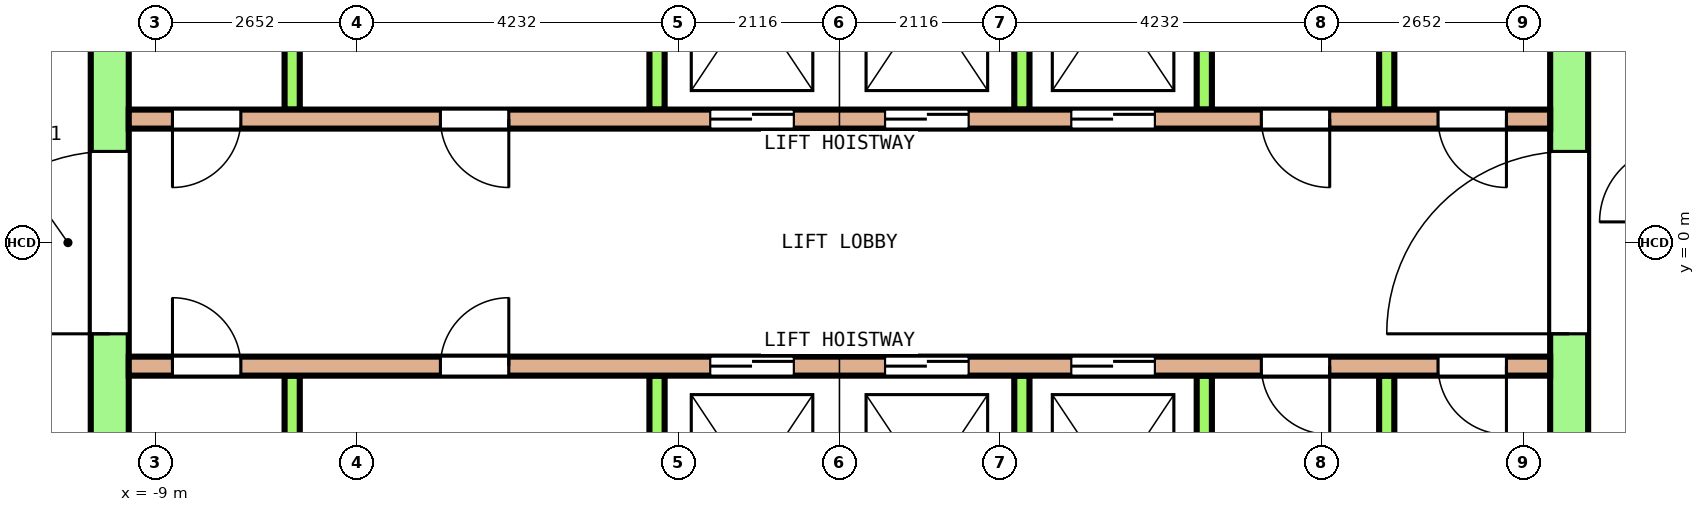
"""IFC4 building model, lengths in metres.
Left out: names, types, materials, properties, quantities, classifications, styles, units other than length and angle.
Written with IfcOpenShell. Run it as: python <this file> out.ifc"""

import sys

from ifc_helpers import new_model, si_unit, direction, frame, frame_2d, origin, place, context, subcontext, project, spatial, rectangle, extrude, element, fill, save


model = new_model("IFC4")
c1 = context("Model", 3, precision=1e-05, world=origin(), true_north=direction((0.0, 1.0)))
c2 = subcontext(c1, "Body", "Model", "MODEL_VIEW")
j1 = project(units=[si_unit("LENGTHUNIT", "METRE"), si_unit("PLANEANGLEUNIT", "RADIAN")], contexts=[c1])
p1 = place(None, origin())
s1 = spatial("IfcSite", under=j1, at=p1, CompositionType="ELEMENT")
p2 = place(p1, origin())
s2 = spatial("IfcBuilding", under=s1, at=p2, CompositionType="ELEMENT")
p3 = place(p2, frame((0.0, 0.0, 249.4)))
s3 = spatial("IfcBuildingStorey", under=s2, at=p3, CompositionType="ELEMENT", Elevation=249.4)
p4 = place(p3, frame((-9.6, -7.8, 0.0), z_axis=(0.0, 0.0, 1.0), x_axis=(0.0, 1.0, 0.0)))
e1 = element("IfcWall", 1, at=p4, inside=s3, PredefinedType="SHEAR", context=c2, shape_type="SweptSolid", body=[
    extrude(rectangle(XDim=15.6, YDim=0.5, at=frame_2d((7.8, 0.0))), origin(), (0.0, 0.0, 1.0), 3.7),
])
p5 = place(p4, frame((6.6, 0.0, 0.0)))
e2 = element("IfcOpeningElement", 2, at=p5, cuts=e1, PredefinedType="OPENING", context=c2, shape_type="SweptSolid", body=[
    extrude(rectangle(XDim=2.4, YDim=2.1, at=frame_2d((1.2, 1.05))), frame((0.0, 0.26, 0.0), z_axis=(0.0, -1.0, 0.0), x_axis=(1.0, 0.0, 0.0)), (0.0, 0.0, 1.0), 0.52),
])
p6 = place(p4, frame((13.5, 0.0, 0.0)))
e3 = element("IfcOpeningElement", 3, at=p6, cuts=e1, PredefinedType="OPENING", context=c2, shape_type="SweptSolid", body=[
    extrude(rectangle(XDim=1.2, YDim=2.1, at=frame_2d((0.6, 1.05))), frame((0.0, 0.26, 0.0), z_axis=(0.0, -1.0, 0.0), x_axis=(1.0, 0.0, 0.0)), (0.0, 0.0, 1.0), 0.52),
])
p7 = place(p4, frame((0.9, 0.0, 0.0)))
e4 = element("IfcOpeningElement", 4, at=p7, cuts=e1, PredefinedType="OPENING", context=c2, shape_type="SweptSolid", body=[
    extrude(rectangle(XDim=1.2, YDim=2.1, at=frame_2d((0.6, 1.05))), frame((0.0, 0.26, 0.0), z_axis=(0.0, -1.0, 0.0), x_axis=(1.0, 0.0, 0.0)), (0.0, 0.0, 1.0), 0.52),
])
p8 = place(p3, frame((9.6, -7.8, 0.0), z_axis=(0.0, 0.0, 1.0), x_axis=(0.0, 1.0, 0.0)))
e5 = element("IfcWall", 5, at=p8, inside=s3, PredefinedType="SHEAR", context=c2, shape_type="SweptSolid", body=[
    extrude(rectangle(XDim=15.6, YDim=0.5, at=frame_2d((7.8, 0.0))), origin(), (0.0, 0.0, 1.0), 3.7),
])
p9 = place(p8, frame((6.6, 0.0, 0.0)))
e6 = element("IfcOpeningElement", 6, at=p9, cuts=e5, PredefinedType="OPENING", context=c2, shape_type="SweptSolid", body=[
    extrude(rectangle(XDim=2.4, YDim=2.1, at=frame_2d((1.2, 1.05))), frame((0.0, 0.26, 0.0), z_axis=(0.0, -1.0, 0.0), x_axis=(1.0, 0.0, 0.0)), (0.0, 0.0, 1.0), 0.52),
])
p10 = place(p8, frame((13.5, 0.0, 0.0)))
e7 = element("IfcOpeningElement", 7, at=p10, cuts=e5, PredefinedType="OPENING", context=c2, shape_type="SweptSolid", body=[
    extrude(rectangle(XDim=1.2, YDim=2.1, at=frame_2d((0.6, 1.05))), frame((0.0, 0.26, 0.0), z_axis=(0.0, -1.0, 0.0), x_axis=(1.0, 0.0, 0.0)), (0.0, 0.0, 1.0), 0.52),
])
p11 = place(p8, frame((1.0, 0.0, 0.0)))
e8 = element("IfcOpeningElement", 8, at=p11, cuts=e5, PredefinedType="OPENING", context=c2, shape_type="SweptSolid", body=[
    extrude(rectangle(XDim=1.0, YDim=2.1, at=frame_2d((0.5, 1.05))), frame((0.0, 0.26, 0.0), z_axis=(0.0, -1.0, 0.0), x_axis=(1.0, 0.0, 0.0)), (0.0, 0.0, 1.0), 0.52),
])
p12 = place(p3, frame((-9.35, 1.625, 0.0), z_axis=(0.0, 0.0, 1.0), x_axis=(1.0, 0.0, 0.0)))
e9 = element("IfcWall", 9, at=p12, inside=s3, PredefinedType="SOLIDWALL", context=c2, shape_type="SweptSolid", body=[
    extrude(rectangle(XDim=18.7, YDim=0.25, at=frame_2d((9.35, 0.0))), origin(), (0.0, 0.0, 1.0), 3.7),
])
p13 = place(p12, frame((7.65, 0.0, 0.0)))
e10 = element("IfcOpeningElement", 10, at=p13, cuts=e9, PredefinedType="OPENING", context=c2, shape_type="SweptSolid", body=[
    extrude(rectangle(XDim=1.1, YDim=2.1, at=frame_2d((0.55, 1.05))), frame((0.0, 0.135, 0.0), z_axis=(0.0, -1.0, 0.0), x_axis=(1.0, 0.0, 0.0)), (0.0, 0.0, 1.0), 0.27),
])
p14 = place(p12, frame((9.95, 0.0, 0.0)))
e11 = element("IfcOpeningElement", 11, at=p14, cuts=e9, PredefinedType="OPENING", context=c2, shape_type="SweptSolid", body=[
    extrude(rectangle(XDim=1.1, YDim=2.1, at=frame_2d((0.55, 1.05))), frame((0.0, 0.135, 0.0), z_axis=(0.0, -1.0, 0.0), x_axis=(1.0, 0.0, 0.0)), (0.0, 0.0, 1.0), 0.27),
])
p15 = place(p12, frame((12.4, 0.0, 0.0)))
e12 = element("IfcOpeningElement", 12, at=p15, cuts=e9, PredefinedType="OPENING", context=c2, shape_type="SweptSolid", body=[
    extrude(rectangle(XDim=1.1, YDim=2.1, at=frame_2d((0.55, 1.05))), frame((0.0, 0.135, 0.0), z_axis=(0.0, -1.0, 0.0), x_axis=(1.0, 0.0, 0.0)), (0.0, 0.0, 1.0), 0.27),
])
p16 = place(p12, frame((0.575, 0.0, 0.0)))
e13 = element("IfcOpeningElement", 13, at=p16, cuts=e9, PredefinedType="OPENING", context=c2, shape_type="SweptSolid", body=[
    extrude(rectangle(XDim=0.9, YDim=2.1, at=frame_2d((0.45, 1.05))), frame((0.0, 0.135, 0.0), z_axis=(0.0, -1.0, 0.0), x_axis=(1.0, 0.0, 0.0)), (0.0, 0.0, 1.0), 0.27),
])
p17 = place(p12, frame((4.1, 0.0, 0.0)))
e14 = element("IfcOpeningElement", 14, at=p17, cuts=e9, PredefinedType="OPENING", context=c2, shape_type="SweptSolid", body=[
    extrude(rectangle(XDim=0.9, YDim=2.1, at=frame_2d((0.45, 1.05))), frame((0.0, 0.135, 0.0), z_axis=(0.0, -1.0, 0.0), x_axis=(1.0, 0.0, 0.0)), (0.0, 0.0, 1.0), 0.27),
])
p18 = place(p12, frame((14.9, 0.0, 0.0)))
e15 = element("IfcOpeningElement", 15, at=p18, cuts=e9, PredefinedType="OPENING", context=c2, shape_type="SweptSolid", body=[
    extrude(rectangle(XDim=0.9, YDim=2.1, at=frame_2d((0.45, 1.05))), frame((0.0, 0.135, 0.0), z_axis=(0.0, -1.0, 0.0), x_axis=(1.0, 0.0, 0.0)), (0.0, 0.0, 1.0), 0.27),
])
p19 = place(p12, frame((17.225, 0.0, 0.0)))
e16 = element("IfcOpeningElement", 16, at=p19, cuts=e9, PredefinedType="OPENING", context=c2, shape_type="SweptSolid", body=[
    extrude(rectangle(XDim=0.9, YDim=2.1, at=frame_2d((0.45, 1.05))), frame((0.0, 0.135, 0.0), z_axis=(0.0, -1.0, 0.0), x_axis=(1.0, 0.0, 0.0)), (0.0, 0.0, 1.0), 0.27),
])
for number, where, z_axis, x_axis in (
    (17, (-7.2, 1.75, 0.0), (0.0, 0.0, 1.0), (0.0, 1.0, 0.0)),
    (18, (-2.4, 1.75, 0.0), (0.0, 0.0, 1.0), (0.0, 1.0, 0.0)),
    (19, (2.4, 1.75, 0.0), (0.0, 0.0, 1.0), (0.0, 1.0, 0.0)),
    (20, (4.8, 1.75, 0.0), (0.0, 0.0, 1.0), (0.0, 1.0, 0.0)),
    (21, (7.2, 1.75, 0.0), (0.0, 0.0, 1.0), (0.0, 1.0, 0.0)),
):
    element("IfcWall", number, at=place(p3, frame(where, z_axis=z_axis, x_axis=x_axis)), inside=s3, PredefinedType="SOLIDWALL", context=c2, shape_type="SweptSolid", body=[
        extrude(rectangle(XDim=2.9, YDim=0.2, at=frame_2d((1.45, 0.0))), origin(), (0.0, 0.0, 1.0), 3.7),
    ])
p20 = place(p3, frame((-9.35, -1.625, 0.0), z_axis=(0.0, 0.0, 1.0), x_axis=(1.0, 0.0, 0.0)))
e22 = element("IfcWall", 22, at=p20, inside=s3, PredefinedType="SOLIDWALL", context=c2, shape_type="SweptSolid", body=[
    extrude(rectangle(XDim=18.7, YDim=0.25, at=frame_2d((9.35, 0.0))), origin(), (0.0, 0.0, 1.0), 3.7),
])
p21 = place(p20, frame((7.65, 0.0, 0.0)))
e23 = element("IfcOpeningElement", 23, at=p21, cuts=e22, PredefinedType="OPENING", context=c2, shape_type="SweptSolid", body=[
    extrude(rectangle(XDim=1.1, YDim=2.1, at=frame_2d((0.55, 1.05))), frame((0.0, 0.135, 0.0), z_axis=(0.0, -1.0, 0.0), x_axis=(1.0, 0.0, 0.0)), (0.0, 0.0, 1.0), 0.27),
])
p22 = place(p20, frame((9.95, 0.0, 0.0)))
e24 = element("IfcOpeningElement", 24, at=p22, cuts=e22, PredefinedType="OPENING", context=c2, shape_type="SweptSolid", body=[
    extrude(rectangle(XDim=1.1, YDim=2.1, at=frame_2d((0.55, 1.05))), frame((0.0, 0.135, 0.0), z_axis=(0.0, -1.0, 0.0), x_axis=(1.0, 0.0, 0.0)), (0.0, 0.0, 1.0), 0.27),
])
p23 = place(p20, frame((12.4, 0.0, 0.0)))
e25 = element("IfcOpeningElement", 25, at=p23, cuts=e22, PredefinedType="OPENING", context=c2, shape_type="SweptSolid", body=[
    extrude(rectangle(XDim=1.1, YDim=2.1, at=frame_2d((0.55, 1.05))), frame((0.0, 0.135, 0.0), z_axis=(0.0, -1.0, 0.0), x_axis=(1.0, 0.0, 0.0)), (0.0, 0.0, 1.0), 0.27),
])
p24 = place(p20, frame((0.575, 0.0, 0.0)))
e26 = element("IfcOpeningElement", 26, at=p24, cuts=e22, PredefinedType="OPENING", context=c2, shape_type="SweptSolid", body=[
    extrude(rectangle(XDim=0.9, YDim=2.1, at=frame_2d((0.45, 1.05))), frame((0.0, 0.135, 0.0), z_axis=(0.0, -1.0, 0.0), x_axis=(1.0, 0.0, 0.0)), (0.0, 0.0, 1.0), 0.27),
])
p25 = place(p20, frame((4.1, 0.0, 0.0)))
e27 = element("IfcOpeningElement", 27, at=p25, cuts=e22, PredefinedType="OPENING", context=c2, shape_type="SweptSolid", body=[
    extrude(rectangle(XDim=0.9, YDim=2.1, at=frame_2d((0.45, 1.05))), frame((0.0, 0.135, 0.0), z_axis=(0.0, -1.0, 0.0), x_axis=(1.0, 0.0, 0.0)), (0.0, 0.0, 1.0), 0.27),
])
p26 = place(p20, frame((14.9, 0.0, 0.0)))
e28 = element("IfcOpeningElement", 28, at=p26, cuts=e22, PredefinedType="OPENING", context=c2, shape_type="SweptSolid", body=[
    extrude(rectangle(XDim=0.9, YDim=2.1, at=frame_2d((0.45, 1.05))), frame((0.0, 0.135, 0.0), z_axis=(0.0, -1.0, 0.0), x_axis=(1.0, 0.0, 0.0)), (0.0, 0.0, 1.0), 0.27),
])
p27 = place(p20, frame((17.225, 0.0, 0.0)))
e29 = element("IfcOpeningElement", 29, at=p27, cuts=e22, PredefinedType="OPENING", context=c2, shape_type="SweptSolid", body=[
    extrude(rectangle(XDim=0.9, YDim=2.1, at=frame_2d((0.45, 1.05))), frame((0.0, 0.135, 0.0), z_axis=(0.0, -1.0, 0.0), x_axis=(1.0, 0.0, 0.0)), (0.0, 0.0, 1.0), 0.27),
])
for number, where, z_axis, x_axis in (
    (30, (-7.2, -4.65, 0.0), (0.0, 0.0, 1.0), (0.0, 1.0, 0.0)),
    (31, (-2.4, -4.65, 0.0), (0.0, 0.0, 1.0), (0.0, 1.0, 0.0)),
    (32, (2.4, -4.65, 0.0), (0.0, 0.0, 1.0), (0.0, 1.0, 0.0)),
    (33, (4.8, -4.65, 0.0), (0.0, 0.0, 1.0), (0.0, 1.0, 0.0)),
    (34, (7.2, -4.65, 0.0), (0.0, 0.0, 1.0), (0.0, 1.0, 0.0)),
):
    element("IfcWall", number, at=place(p3, frame(where, z_axis=z_axis, x_axis=x_axis)), inside=s3, PredefinedType="SOLIDWALL", context=c2, shape_type="SweptSolid", body=[
        extrude(rectangle(XDim=2.9, YDim=0.2, at=frame_2d((1.45, 0.0))), origin(), (0.0, 0.0, 1.0), 3.7),
    ])
p28 = place(p13, origin())
e35 = element("IfcDoor", 35, at=p28, inside=s3, OperationType="DOUBLE_DOOR_SLIDING", PredefinedType="DOOR", context=c2, shape_type="SweptSolid", body=[
    extrude(rectangle(XDim=1.1, YDim=2.1, at=frame_2d((0.55, 1.05))), frame((0.0, 0.075, 0.0), z_axis=(0.0, -1.0, 0.0), x_axis=(1.0, 0.0, 0.0)), (0.0, 0.0, 1.0), 0.15),
])
fill(e10, e35)
p29 = place(p14, origin())
e36 = element("IfcDoor", 36, at=p29, inside=s3, OperationType="DOUBLE_DOOR_SLIDING", PredefinedType="DOOR", context=c2, shape_type="SweptSolid", body=[
    extrude(rectangle(XDim=1.1, YDim=2.1, at=frame_2d((0.55, 1.05))), frame((0.0, 0.075, 0.0), z_axis=(0.0, -1.0, 0.0), x_axis=(1.0, 0.0, 0.0)), (0.0, 0.0, 1.0), 0.15),
])
fill(e11, e36)
p30 = place(p15, origin())
e37 = element("IfcDoor", 37, at=p30, inside=s3, OperationType="DOUBLE_DOOR_SLIDING", PredefinedType="DOOR", context=c2, shape_type="SweptSolid", body=[
    extrude(rectangle(XDim=1.1, YDim=2.1, at=frame_2d((0.55, 1.05))), frame((0.0, 0.075, 0.0), z_axis=(0.0, -1.0, 0.0), x_axis=(1.0, 0.0, 0.0)), (0.0, 0.0, 1.0), 0.15),
])
fill(e12, e37)
p31 = place(p21, origin())
e38 = element("IfcDoor", 38, at=p31, inside=s3, OperationType="DOUBLE_DOOR_SLIDING", PredefinedType="DOOR", context=c2, shape_type="SweptSolid", body=[
    extrude(rectangle(XDim=1.1, YDim=2.1, at=frame_2d((0.55, 1.05))), frame((0.0, 0.075, 0.0), z_axis=(0.0, -1.0, 0.0), x_axis=(1.0, 0.0, 0.0)), (0.0, 0.0, 1.0), 0.15),
])
fill(e23, e38)
p32 = place(p22, origin())
e39 = element("IfcDoor", 39, at=p32, inside=s3, OperationType="DOUBLE_DOOR_SLIDING", PredefinedType="DOOR", context=c2, shape_type="SweptSolid", body=[
    extrude(rectangle(XDim=1.1, YDim=2.1, at=frame_2d((0.55, 1.05))), frame((0.0, 0.075, 0.0), z_axis=(0.0, -1.0, 0.0), x_axis=(1.0, 0.0, 0.0)), (0.0, 0.0, 1.0), 0.15),
])
fill(e24, e39)
p33 = place(p23, origin())
e40 = element("IfcDoor", 40, at=p33, inside=s3, OperationType="DOUBLE_DOOR_SLIDING", PredefinedType="DOOR", context=c2, shape_type="SweptSolid", body=[
    extrude(rectangle(XDim=1.1, YDim=2.1, at=frame_2d((0.55, 1.05))), frame((0.0, 0.075, 0.0), z_axis=(0.0, -1.0, 0.0), x_axis=(1.0, 0.0, 0.0)), (0.0, 0.0, 1.0), 0.15),
])
fill(e25, e40)
p34 = place(p5, origin())
e41 = element("IfcDoor", 41, at=p34, inside=s3, OperationType="DOUBLE_DOOR_SINGLE_SWING", PredefinedType="DOOR", context=c2, shape_type="SweptSolid", body=[
    extrude(rectangle(XDim=2.4, YDim=2.1, at=frame_2d((1.2, 1.05))), frame((0.0, 0.2, 0.0), z_axis=(0.0, -1.0, 0.0), x_axis=(1.0, 0.0, 0.0)), (0.0, 0.0, 1.0), 0.4),
])
fill(e2, e41)
p35 = place(p9, origin())
e42 = element("IfcDoor", 42, at=p35, inside=s3, OperationType="DOUBLE_DOOR_SINGLE_SWING", PredefinedType="DOOR", context=c2, shape_type="SweptSolid", body=[
    extrude(rectangle(XDim=2.4, YDim=2.1, at=frame_2d((1.2, 1.05))), frame((0.0, 0.2, 0.0), z_axis=(0.0, -1.0, 0.0), x_axis=(1.0, 0.0, 0.0)), (0.0, 0.0, 1.0), 0.4),
])
fill(e6, e42)
p36 = place(p16, origin())
e43 = element("IfcDoor", 43, at=p36, inside=s3, OperationType="SINGLE_SWING_RIGHT", PredefinedType="DOOR", context=c2, shape_type="SweptSolid", body=[
    extrude(rectangle(XDim=0.9, YDim=2.1, at=frame_2d((0.45, 1.05))), frame((0.0, 0.075, 0.0), z_axis=(0.0, -1.0, 0.0), x_axis=(1.0, 0.0, 0.0)), (0.0, 0.0, 1.0), 0.15),
])
fill(e13, e43)
p37 = place(p17, origin())
e44 = element("IfcDoor", 44, at=p37, inside=s3, OperationType="SINGLE_SWING_LEFT", PredefinedType="DOOR", context=c2, shape_type="SweptSolid", body=[
    extrude(rectangle(XDim=0.9, YDim=2.1, at=frame_2d((0.45, 1.05))), frame((0.0, 0.075, 0.0), z_axis=(0.0, -1.0, 0.0), x_axis=(1.0, 0.0, 0.0)), (0.0, 0.0, 1.0), 0.15),
])
fill(e14, e44)
p38 = place(p18, origin())
e45 = element("IfcDoor", 45, at=p38, inside=s3, OperationType="SINGLE_SWING_RIGHT", PredefinedType="DOOR", context=c2, shape_type="SweptSolid", body=[
    extrude(rectangle(XDim=0.9, YDim=2.1, at=frame_2d((0.45, 1.05))), frame((0.0, 0.075, 0.0), z_axis=(0.0, -1.0, 0.0), x_axis=(1.0, 0.0, 0.0)), (0.0, 0.0, 1.0), 0.15),
])
fill(e15, e45)
p39 = place(p19, origin())
e46 = element("IfcDoor", 46, at=p39, inside=s3, OperationType="SINGLE_SWING_LEFT", PredefinedType="DOOR", context=c2, shape_type="SweptSolid", body=[
    extrude(rectangle(XDim=0.9, YDim=2.1, at=frame_2d((0.45, 1.05))), frame((0.0, 0.075, 0.0), z_axis=(0.0, -1.0, 0.0), x_axis=(1.0, 0.0, 0.0)), (0.0, 0.0, 1.0), 0.15),
])
fill(e16, e46)
p40 = place(p24, origin())
e47 = element("IfcDoor", 47, at=p40, inside=s3, OperationType="SINGLE_SWING_RIGHT", PredefinedType="DOOR", context=c2, shape_type="SweptSolid", body=[
    extrude(rectangle(XDim=0.9, YDim=2.1, at=frame_2d((0.45, 1.05))), frame((0.0, 0.075, 0.0), z_axis=(0.0, -1.0, 0.0), x_axis=(1.0, 0.0, 0.0)), (0.0, 0.0, 1.0), 0.15),
])
fill(e26, e47)
p41 = place(p25, origin())
e48 = element("IfcDoor", 48, at=p41, inside=s3, OperationType="SINGLE_SWING_LEFT", PredefinedType="DOOR", context=c2, shape_type="SweptSolid", body=[
    extrude(rectangle(XDim=0.9, YDim=2.1, at=frame_2d((0.45, 1.05))), frame((0.0, 0.075, 0.0), z_axis=(0.0, -1.0, 0.0), x_axis=(1.0, 0.0, 0.0)), (0.0, 0.0, 1.0), 0.15),
])
fill(e27, e48)
p42 = place(p26, origin())
e49 = element("IfcDoor", 49, at=p42, inside=s3, OperationType="SINGLE_SWING_RIGHT", PredefinedType="DOOR", context=c2, shape_type="SweptSolid", body=[
    extrude(rectangle(XDim=0.9, YDim=2.1, at=frame_2d((0.45, 1.05))), frame((0.0, 0.075, 0.0), z_axis=(0.0, -1.0, 0.0), x_axis=(1.0, 0.0, 0.0)), (0.0, 0.0, 1.0), 0.15),
])
fill(e28, e49)
p43 = place(p27, origin())
e50 = element("IfcDoor", 50, at=p43, inside=s3, OperationType="SINGLE_SWING_LEFT", PredefinedType="DOOR", context=c2, shape_type="SweptSolid", body=[
    extrude(rectangle(XDim=0.9, YDim=2.1, at=frame_2d((0.45, 1.05))), frame((0.0, 0.075, 0.0), z_axis=(0.0, -1.0, 0.0), x_axis=(1.0, 0.0, 0.0)), (0.0, 0.0, 1.0), 0.15),
])
fill(e29, e50)
save(model, sys.argv[1])
